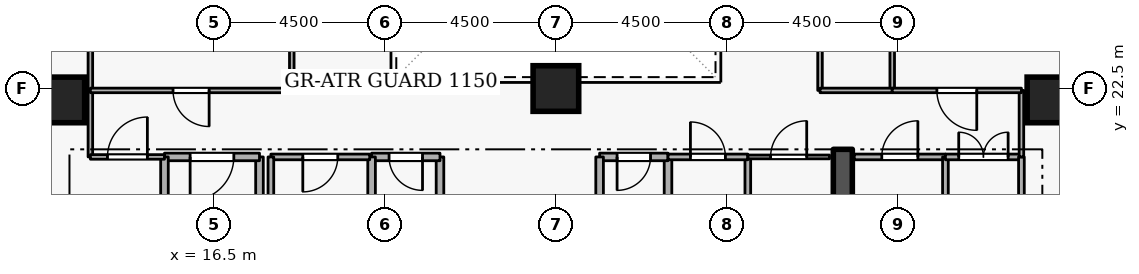
"""IFC4 building model, lengths in metres.
Left out: names, types, materials, properties, quantities, classifications, styles, units other than length and angle.
Written with IfcOpenShell. Run it as: python <this file> out.ifc"""

import sys

from ifc_helpers import new_model, si_unit, direction, frame, frame_2d, origin, origin_2d, place, context, subcontext, project, spatial, rectangle, extrude, element, fill, save


model = new_model("IFC4")
c1 = context("Model", 3, precision=1e-05, world=origin(), true_north=direction((0.0, 1.0)))
c2 = subcontext(c1, "Body", "Model", "MODEL_VIEW")
j1 = project(units=[si_unit("LENGTHUNIT", "METRE"), si_unit("PLANEANGLEUNIT", "RADIAN")], contexts=[c1])
p1 = place(None, origin())
s1 = spatial("IfcSite", under=j1, at=p1, CompositionType="ELEMENT")
p2 = place(p1, origin())
s2 = spatial("IfcBuilding", under=s1, at=p2, CompositionType="ELEMENT")
p3 = place(p2, frame((0.0, 0.0, 137.7)))
s3 = spatial("IfcBuildingStorey", under=s2, at=p3, CompositionType="ELEMENT", Elevation=137.7)
p4 = place(p3, frame((33.05, 15.1, 0.0), z_axis=(0.0, 0.0, 1.0), x_axis=(0.0, 1.0, 0.0)))
e1 = element("IfcWall", 1, at=p4, inside=s3, PredefinedType="SHEAR", context=c2, shape_type="SweptSolid", body=[
    extrude(rectangle(XDim=5.8, YDim=0.5, at=frame_2d((2.9, 0.0))), origin(), (0.0, 0.0, 1.0), 3.6),
])
for number, where, z_axis, x_axis in (
    (2, (12.5, 22.2, 0.0), (0.0, 0.0, 1.0), (1.0, 0.0, 0.0)),
    (3, (38.5, 22.2, 0.0), (0.0, 0.0, 1.0), (1.0, 0.0, 0.0)),
    (4, (25.5, 22.5, 0.0), (0.0, 0.0, 1.0), (1.0, 0.0, 0.0)),
):
    element("IfcColumn", number, at=place(p3, frame(where, z_axis=z_axis, x_axis=x_axis)), inside=s3, PredefinedType="COLUMN", context=c2, shape_type="SweptSolid", body=[
        extrude(rectangle(XDim=1.2, YDim=1.2, at=origin_2d()), origin(), (0.0, 0.0, 1.0), 3.6),
    ])
p5 = place(p3, frame((17.7, 18.4, 0.0), z_axis=(0.0, 0.0, 1.0), x_axis=(0.0, 1.0, 0.0)))
e5 = element("IfcWall", 5, at=p5, inside=s3, PredefinedType="STANDARD", context=c2, shape_type="SweptSolid", body=[
    extrude(rectangle(XDim=2.3, YDim=0.2, at=frame_2d((1.15, 0.0))), origin(), (0.0, 0.0, 1.0), 2.465),
])
p6 = place(p3, frame((17.7, 20.7, 0.0), z_axis=(0.0, 0.0, 1.0), x_axis=(-1.0, 0.0, 0.0)))
e6 = element("IfcWall", 6, at=p6, inside=s3, PredefinedType="STANDARD", context=c2, shape_type="SweptSolid", body=[
    extrude(rectangle(XDim=2.5, YDim=0.2, at=frame_2d((1.25, 0.0))), origin(), (0.0, 0.0, 1.0), 3.26),
])
p7 = place(p6, frame((0.675, 0.0, 0.0)))
e7 = element("IfcOpeningElement", 7, at=p7, cuts=e6, PredefinedType="OPENING", context=c2, shape_type="SweptSolid", body=[
    extrude(rectangle(XDim=1.15, YDim=2.1, at=frame_2d((0.575, 1.05))), frame((0.0, 0.11, 0.0), z_axis=(0.0, -1.0, 0.0), x_axis=(1.0, 0.0, 0.0)), (0.0, 0.0, 1.0), 0.22),
])
p8 = place(p3, frame((15.2, 20.7, 0.0), z_axis=(0.0, 0.0, 1.0), x_axis=(0.0, -1.0, 0.0)))
e8 = element("IfcWall", 8, at=p8, inside=s3, PredefinedType="STANDARD", context=c2, shape_type="SweptSolid", body=[
    extrude(rectangle(XDim=5.7, YDim=0.2, at=frame_2d((2.85, 0.0))), origin(), (0.0, 0.0, 1.0), 3.26),
])
p9 = place(p3, frame((28.45, 18.65, 0.0), z_axis=(0.0, 0.0, 1.0), x_axis=(0.0, 1.0, 0.0)))
e9 = element("IfcWall", 9, at=p9, inside=s3, PredefinedType="STANDARD", context=c2, shape_type="SweptSolid", body=[
    extrude(rectangle(XDim=2.05, YDim=0.2, at=frame_2d((1.025, 0.0))), origin(), (0.0, 0.0, 1.0), 3.26),
])
p10 = place(p3, frame((28.45, 20.7, 0.0), z_axis=(0.0, 0.0, 1.0), x_axis=(-1.0, 0.0, 0.0)))
e10 = element("IfcWall", 10, at=p10, inside=s3, PredefinedType="STANDARD", context=c2, shape_type="SweptSolid", body=[
    extrude(rectangle(XDim=1.8, YDim=0.2, at=frame_2d((0.9, 0.0))), origin(), (0.0, 0.0, 1.0), 3.26),
])
p11 = place(p10, frame((0.46, 0.0, 0.0)))
e11 = element("IfcOpeningElement", 11, at=p11, cuts=e10, PredefinedType="OPENING", context=c2, shape_type="SweptSolid", body=[
    extrude(rectangle(XDim=0.88, YDim=2.04, at=frame_2d((0.44, 1.02))), frame((0.0, 0.11, 0.0), z_axis=(0.0, -1.0, 0.0), x_axis=(1.0, 0.0, 0.0)), (0.0, 0.0, 1.0), 0.22),
])
for number, where, z_axis, x_axis in (
    (12, (26.65, 20.7, 0.0), (0.0, 0.0, 1.0), (0.0, -1.0, 0.0)),
    (13, (22.45, 18.65, 0.0), (0.0, 0.0, 1.0), (0.0, 1.0, 0.0)),
):
    element("IfcWall", number, at=place(p3, frame(where, z_axis=z_axis, x_axis=x_axis)), inside=s3, PredefinedType="STANDARD", context=c2, shape_type="SweptSolid", body=[
        extrude(rectangle(XDim=2.05, YDim=0.2, at=frame_2d((1.025, 0.0))), origin(), (0.0, 0.0, 1.0), 3.26),
    ])
p12 = place(p3, frame((22.45, 20.7, 0.0), z_axis=(0.0, 0.0, 1.0), x_axis=(-1.0, 0.0, 0.0)))
e14 = element("IfcWall", 14, at=p12, inside=s3, PredefinedType="STANDARD", context=c2, shape_type="SweptSolid", body=[
    extrude(rectangle(XDim=1.8, YDim=0.2, at=frame_2d((0.9, 0.0))), origin(), (0.0, 0.0, 1.0), 3.26),
])
p13 = place(p12, frame((0.46, 0.0, 0.0)))
e15 = element("IfcOpeningElement", 15, at=p13, cuts=e14, PredefinedType="OPENING", context=c2, shape_type="SweptSolid", body=[
    extrude(rectangle(XDim=0.88, YDim=2.04, at=frame_2d((0.44, 1.02))), frame((0.0, 0.11, 0.0), z_axis=(0.0, -1.0, 0.0), x_axis=(1.0, 0.0, 0.0)), (0.0, 0.0, 1.0), 0.22),
])
p14 = place(p3, frame((20.65, 20.7, 0.0), z_axis=(0.0, 0.0, 1.0), x_axis=(0.0, -1.0, 0.0)))
e16 = element("IfcWall", 16, at=p14, inside=s3, PredefinedType="STANDARD", context=c2, shape_type="SweptSolid", body=[
    extrude(rectangle(XDim=2.05, YDim=0.2, at=frame_2d((1.025, 0.0))), origin(), (0.0, 0.0, 1.0), 3.26),
])
p15 = place(p3, frame((20.6, 20.7, 0.0), z_axis=(0.0, 0.0, 1.0), x_axis=(-1.0, 0.0, 0.0)))
e17 = element("IfcWall", 17, at=p15, inside=s3, PredefinedType="PARTITIONING", context=c2, shape_type="SweptSolid", body=[
    extrude(rectangle(XDim=2.6, YDim=0.15, at=frame_2d((1.3, 0.0))), origin(), (0.0, 0.0, 1.0), 3.26),
])
p16 = place(p15, frame((0.84, 0.0, 0.0)))
e18 = element("IfcOpeningElement", 18, at=p16, cuts=e17, PredefinedType="OPENING", context=c2, shape_type="SweptSolid", body=[
    extrude(rectangle(XDim=0.92, YDim=2.08, at=frame_2d((0.46, 1.04))), frame((0.0, 0.085, 0.0), z_axis=(0.0, -1.0, 0.0), x_axis=(1.0, 0.0, 0.0)), (0.0, 0.0, 1.0), 0.17),
])
p17 = place(p3, frame((18.0, 20.7, 0.0), z_axis=(0.0, 0.0, 1.0), x_axis=(0.0, -1.0, 0.0)))
e19 = element("IfcWall", 19, at=p17, inside=s3, PredefinedType="PARTITIONING", context=c2, shape_type="SweptSolid", body=[
    extrude(rectangle(XDim=2.05, YDim=0.15, at=frame_2d((1.025, 0.0))), origin(), (0.0, 0.0, 1.0), 2.465),
])
p18 = place(p3, frame((30.55, 20.7, 0.0), z_axis=(0.0, 0.0, 1.0), x_axis=(0.0, -1.0, 0.0)))
e20 = element("IfcWall", 20, at=p18, inside=s3, PredefinedType="PARTITIONING", context=c2, shape_type="SweptSolid", body=[
    extrude(rectangle(XDim=2.05, YDim=0.15, at=frame_2d((1.025, 0.0))), origin(), (0.0, 0.0, 1.0), 3.26),
])
p19 = place(p3, frame((28.45, 20.7, 0.0), z_axis=(0.0, 0.0, 1.0), x_axis=(1.0, 0.0, 0.0)))
e21 = element("IfcWall", 21, at=p19, inside=s3, PredefinedType="PARTITIONING", context=c2, shape_type="SweptSolid", body=[
    extrude(rectangle(XDim=2.1, YDim=0.15, at=frame_2d((1.05, 0.0))), origin(), (0.0, 0.0, 1.0), 3.26),
])
p20 = place(p19, frame((0.59, 0.0, 0.0)))
e22 = element("IfcOpeningElement", 22, at=p20, cuts=e21, PredefinedType="OPENING", context=c2, shape_type="SweptSolid", body=[
    extrude(rectangle(XDim=0.92, YDim=2.08, at=frame_2d((0.46, 1.04))), frame((0.0, 0.085, 0.0), z_axis=(0.0, -1.0, 0.0), x_axis=(1.0, 0.0, 0.0)), (0.0, 0.0, 1.0), 0.17),
])
p21 = place(p3, frame((30.55, 20.7, 0.0), z_axis=(0.0, 0.0, 1.0), x_axis=(1.0, 0.0, 0.0)))
e23 = element("IfcWall", 23, at=p21, inside=s3, PredefinedType="PARTITIONING", context=c2, shape_type="SweptSolid", body=[
    extrude(rectangle(XDim=2.15, YDim=0.1, at=frame_2d((1.075, 0.0))), origin(), (0.0, 0.0, 1.0), 3.26),
])
p22 = place(p21, frame((0.6, 0.0, 0.0)))
e24 = element("IfcOpeningElement", 24, at=p22, cuts=e23, PredefinedType="OPENING", context=c2, shape_type="SweptSolid", body=[
    extrude(rectangle(XDim=0.95, YDim=2.1, at=frame_2d((0.475, 1.05))), frame((0.0, 0.06, 0.0), z_axis=(0.0, -1.0, 0.0), x_axis=(1.0, 0.0, 0.0)), (0.0, 0.0, 1.0), 0.12),
])
p23 = place(p3, frame((33.35, 20.7, 0.0), z_axis=(0.0, 0.0, 1.0), x_axis=(1.0, 0.0, 0.0)))
e25 = element("IfcWall", 25, at=p23, inside=s3, PredefinedType="PARTITIONING", context=c2, shape_type="SweptSolid", body=[
    extrude(rectangle(XDim=2.4, YDim=0.15, at=frame_2d((1.2, 0.0))), origin(), (0.0, 0.0, 1.0), 3.26),
])
p24 = place(p23, frame((0.725, 0.0, 0.0)))
e26 = element("IfcOpeningElement", 26, at=p24, cuts=e25, PredefinedType="OPENING", context=c2, shape_type="SweptSolid", body=[
    extrude(rectangle(XDim=0.95, YDim=2.1, at=frame_2d((0.475, 1.05))), frame((0.0, 0.085, 0.0), z_axis=(0.0, -1.0, 0.0), x_axis=(1.0, 0.0, 0.0)), (0.0, 0.0, 1.0), 0.17),
])
p25 = place(p3, frame((35.75, 20.7, 0.0), z_axis=(0.0, 0.0, 1.0), x_axis=(0.0, -1.0, 0.0)))
e27 = element("IfcWall", 27, at=p25, inside=s3, PredefinedType="PARTITIONING", context=c2, shape_type="SweptSolid", body=[
    extrude(rectangle(XDim=5.65, YDim=0.15, at=frame_2d((2.825, 0.0))), origin(), (0.0, 0.0, 1.0), 3.26),
])
p26 = place(p3, frame((35.75, 20.7, 0.0), z_axis=(0.0, 0.0, 1.0), x_axis=(1.0, 0.0, 0.0)))
e28 = element("IfcWall", 28, at=p26, inside=s3, PredefinedType="PARTITIONING", context=c2, shape_type="SweptSolid", body=[
    extrude(rectangle(XDim=2.0, YDim=0.15, at=frame_2d((1.0, 0.0))), origin(), (0.0, 0.0, 1.0), 3.26),
])
p27 = place(p26, frame((0.35, 0.0, 0.0)))
e29 = element("IfcOpeningElement", 29, at=p27, cuts=e28, PredefinedType="OPENING", context=c2, shape_type="SweptSolid", body=[
    extrude(rectangle(XDim=1.3, YDim=2.12, at=frame_2d((0.65, 1.06))), frame((0.0, 0.085, 0.0), z_axis=(0.0, -1.0, 0.0), x_axis=(1.0, 0.0, 0.0)), (0.0, 0.0, 1.0), 0.17),
])
p28 = place(p3, frame((37.75, 20.7, 0.0), z_axis=(0.0, 0.0, 1.0), x_axis=(0.0, -1.0, 0.0)))
e30 = element("IfcWall", 30, at=p28, inside=s3, PredefinedType="PARTITIONING", context=c2, shape_type="SweptSolid", body=[
    extrude(rectangle(XDim=5.65, YDim=0.15, at=frame_2d((2.825, 0.0))), origin(), (0.0, 0.0, 1.0), 3.26),
])
p29 = place(p3, frame((13.25, 22.45, 0.0), z_axis=(0.0, 0.0, 1.0), x_axis=(0.0, -1.0, 0.0)))
e31 = element("IfcWall", 31, at=p29, inside=s3, PredefinedType="PARTITIONING", context=c2, shape_type="SweptSolid", body=[
    extrude(rectangle(XDim=1.75, YDim=0.12, at=frame_2d((0.875, 0.0))), origin(), (0.0, 0.0, 1.0), 3.26),
])
p30 = place(p3, frame((13.25, 20.7, 0.0), z_axis=(0.0, 0.0, 1.0), x_axis=(1.0, 0.0, 0.0)))
e32 = element("IfcWall", 32, at=p30, inside=s3, PredefinedType="PARTITIONING", context=c2, shape_type="SweptSolid", body=[
    extrude(rectangle(XDim=1.95, YDim=0.12, at=frame_2d((0.975, 0.0))), origin(), (0.0, 0.0, 1.0), 3.26),
])
p31 = place(p30, frame((0.45, 0.0, 0.0)))
e33 = element("IfcOpeningElement", 33, at=p31, cuts=e32, PredefinedType="OPENING", context=c2, shape_type="SweptSolid", body=[
    extrude(rectangle(XDim=1.05, YDim=2.1, at=frame_2d((0.525, 1.05))), frame((0.0, 0.07, 0.0), z_axis=(0.0, -1.0, 0.0), x_axis=(1.0, 0.0, 0.0)), (0.0, 0.0, 1.0), 0.14),
])
for number, where, z_axis, x_axis in (
    (34, (13.25, 27.0, 0.0), (0.0, 0.0, 1.0), (0.0, -1.0, 0.0)),
    (35, (18.55, 27.0, 0.0), (0.0, 0.0, 1.0), (0.0, -1.0, 0.0)),
):
    element("IfcWall", number, at=place(p3, frame(where, z_axis=z_axis, x_axis=x_axis)), inside=s3, PredefinedType="PARTITIONING", context=c2, shape_type="SweptSolid", body=[
        extrude(rectangle(XDim=4.55, YDim=0.12, at=frame_2d((2.275, 0.0))), origin(), (0.0, 0.0, 1.0), 3.26),
    ])
p32 = place(p3, frame((18.55, 22.45, 0.0), z_axis=(0.0, 0.0, 1.0), x_axis=(-1.0, 0.0, 0.0)))
e36 = element("IfcWall", 36, at=p32, inside=s3, PredefinedType="PARTITIONING", context=c2, shape_type="SweptSolid", body=[
    extrude(rectangle(XDim=5.3, YDim=0.12, at=frame_2d((2.65, 0.0))), origin(), (0.0, 0.0, 1.0), 3.26),
])
p33 = place(p32, frame((2.175, 0.0, 0.0)))
e37 = element("IfcOpeningElement", 37, at=p33, cuts=e36, PredefinedType="OPENING", context=c2, shape_type="SweptSolid", body=[
    extrude(rectangle(XDim=0.95, YDim=2.1, at=frame_2d((0.475, 1.05))), frame((0.0, 0.07, 0.0), z_axis=(0.0, -1.0, 0.0), x_axis=(1.0, 0.0, 0.0)), (0.0, 0.0, 1.0), 0.14),
])
p34 = place(p3, frame((32.45, 22.45, 0.0), z_axis=(0.0, 0.0, 1.0), x_axis=(0.0, 1.0, 0.0)))
e38 = element("IfcWall", 38, at=p34, inside=s3, PredefinedType="PARTITIONING", context=c2, shape_type="SweptSolid", body=[
    extrude(rectangle(XDim=4.55, YDim=0.12, at=frame_2d((2.275, 0.0))), origin(), (0.0, 0.0, 1.0), 3.26),
])
p35 = place(p34, frame((1.8, 0.0, 0.0)))
e39 = element("IfcOpeningElement", 39, at=p35, cuts=e38, PredefinedType="OPENING", context=c2, shape_type="SweptSolid", body=[
    extrude(rectangle(XDim=0.95, YDim=2.1, at=frame_2d((0.475, 1.05))), frame((0.0, 0.07, 0.0), z_axis=(0.0, -1.0, 0.0), x_axis=(1.0, 0.0, 0.0)), (0.0, 0.0, 1.0), 0.14),
])
p36 = place(p3, frame((34.35, 27.0, 0.0), z_axis=(0.0, 0.0, 1.0), x_axis=(0.0, -1.0, 0.0)))
e40 = element("IfcWall", 40, at=p36, inside=s3, PredefinedType="PARTITIONING", context=c2, shape_type="SweptSolid", body=[
    extrude(rectangle(XDim=4.55, YDim=0.12, at=frame_2d((2.275, 0.0))), origin(), (0.0, 0.0, 1.0), 3.26),
])
p37 = place(p3, frame((34.35, 22.45, 0.0), z_axis=(0.0, 0.0, 1.0), x_axis=(-1.0, 0.0, 0.0)))
e41 = element("IfcWall", 41, at=p37, inside=s3, PredefinedType="PARTITIONING", context=c2, shape_type="SweptSolid", body=[
    extrude(rectangle(XDim=1.9, YDim=0.12, at=frame_2d((0.95, 0.0))), origin(), (0.0, 0.0, 1.0), 3.26),
])
p38 = place(p3, frame((37.75, 20.7, 0.0), z_axis=(0.0, 0.0, 1.0), x_axis=(0.0, 1.0, 0.0)))
e42 = element("IfcWall", 42, at=p38, inside=s3, PredefinedType="PARTITIONING", context=c2, shape_type="SweptSolid", body=[
    extrude(rectangle(XDim=1.75, YDim=0.12, at=frame_2d((0.875, 0.0))), origin(), (0.0, 0.0, 1.0), 3.26),
])
p39 = place(p3, frame((37.75, 22.45, 0.0), z_axis=(0.0, 0.0, 1.0), x_axis=(-1.0, 0.0, 0.0)))
e43 = element("IfcWall", 43, at=p39, inside=s3, PredefinedType="PARTITIONING", context=c2, shape_type="SweptSolid", body=[
    extrude(rectangle(XDim=3.4, YDim=0.12, at=frame_2d((1.7, 0.0))), origin(), (0.0, 0.0, 1.0), 3.26),
])
p40 = place(p39, frame((1.175, 0.0, 0.0)))
e44 = element("IfcOpeningElement", 44, at=p40, cuts=e43, PredefinedType="OPENING", context=c2, shape_type="SweptSolid", body=[
    extrude(rectangle(XDim=1.05, YDim=2.1, at=frame_2d((0.525, 1.05))), frame((0.0, 0.07, 0.0), z_axis=(0.0, -1.0, 0.0), x_axis=(1.0, 0.0, 0.0)), (0.0, 0.0, 1.0), 0.14),
])
p41 = place(p7, origin())
e45 = element("IfcDoor", 45, at=p41, inside=s3, OperationType="SINGLE_SWING_RIGHT", PredefinedType="DOOR", context=c2, shape_type="SweptSolid", body=[
    extrude(rectangle(XDim=1.15, YDim=2.1, at=frame_2d((0.575, 1.05))), frame((0.0, 0.025, 0.0), z_axis=(0.0, -1.0, 0.0), x_axis=(1.0, 0.0, 0.0)), (0.0, 0.0, 1.0), 0.05),
])
fill(e7, e45)
p42 = place(p11, origin())
e46 = element("IfcDoor", 46, at=p42, inside=s3, OperationType="SINGLE_SWING_RIGHT", PredefinedType="DOOR", context=c2, shape_type="SweptSolid", body=[
    extrude(rectangle(XDim=0.88, YDim=2.04, at=frame_2d((0.44, 1.02))), frame((0.0, 0.025, 0.0), z_axis=(0.0, -1.0, 0.0), x_axis=(1.0, 0.0, 0.0)), (0.0, 0.0, 1.0), 0.05),
])
fill(e11, e46)
p43 = place(p13, origin())
e47 = element("IfcDoor", 47, at=p43, inside=s3, OperationType="SINGLE_SWING_LEFT", PredefinedType="DOOR", context=c2, shape_type="SweptSolid", body=[
    extrude(rectangle(XDim=0.88, YDim=2.04, at=frame_2d((0.44, 1.02))), frame((0.0, 0.025, 0.0), z_axis=(0.0, -1.0, 0.0), x_axis=(1.0, 0.0, 0.0)), (0.0, 0.0, 1.0), 0.05),
])
fill(e15, e47)
p44 = place(p16, origin())
e48 = element("IfcDoor", 48, at=p44, inside=s3, OperationType="SINGLE_SWING_RIGHT", PredefinedType="DOOR", context=c2, shape_type="SweptSolid", body=[
    extrude(rectangle(XDim=0.92, YDim=2.08, at=frame_2d((0.46, 1.04))), frame((0.0, 0.025, 0.0), z_axis=(0.0, -1.0, 0.0), x_axis=(1.0, 0.0, 0.0)), (0.0, 0.0, 1.0), 0.05),
])
fill(e18, e48)
p45 = place(p20, origin())
e49 = element("IfcDoor", 49, at=p45, inside=s3, OperationType="SINGLE_SWING_LEFT", PredefinedType="DOOR", context=c2, shape_type="SweptSolid", body=[
    extrude(rectangle(XDim=0.92, YDim=2.08, at=frame_2d((0.46, 1.04))), frame((0.0, 0.025, 0.0), z_axis=(0.0, -1.0, 0.0), x_axis=(1.0, 0.0, 0.0)), (0.0, 0.0, 1.0), 0.05),
])
fill(e22, e49)
p46 = place(p22, origin())
e50 = element("IfcDoor", 50, at=p46, inside=s3, OperationType="SINGLE_SWING_RIGHT", PredefinedType="DOOR", context=c2, shape_type="SweptSolid", body=[
    extrude(rectangle(XDim=0.95, YDim=2.1, at=frame_2d((0.475, 1.05))), frame((0.0, 0.025, 0.0), z_axis=(0.0, -1.0, 0.0), x_axis=(1.0, 0.0, 0.0)), (0.0, 0.0, 1.0), 0.05),
])
fill(e24, e50)
p47 = place(p24, origin())
e51 = element("IfcDoor", 51, at=p47, inside=s3, OperationType="SINGLE_SWING_RIGHT", PredefinedType="DOOR", context=c2, shape_type="SweptSolid", body=[
    extrude(rectangle(XDim=0.95, YDim=2.1, at=frame_2d((0.475, 1.05))), frame((0.0, 0.025, 0.0), z_axis=(0.0, -1.0, 0.0), x_axis=(1.0, 0.0, 0.0)), (0.0, 0.0, 1.0), 0.05),
])
fill(e26, e51)
p48 = place(p27, origin())
e52 = element("IfcDoor", 52, at=p48, inside=s3, OperationType="DOUBLE_DOOR_SINGLE_SWING", PredefinedType="DOOR", context=c2, shape_type="SweptSolid", body=[
    extrude(rectangle(XDim=1.3, YDim=2.12, at=frame_2d((0.65, 1.06))), frame((0.0, 0.025, 0.0), z_axis=(0.0, -1.0, 0.0), x_axis=(1.0, 0.0, 0.0)), (0.0, 0.0, 1.0), 0.05),
])
fill(e29, e52)
p49 = place(p31, origin())
e53 = element("IfcDoor", 53, at=p49, inside=s3, OperationType="SINGLE_SWING_RIGHT", PredefinedType="DOOR", context=c2, shape_type="SweptSolid", body=[
    extrude(rectangle(XDim=1.05, YDim=2.1, at=frame_2d((0.525, 1.05))), frame((0.0, 0.025, 0.0), z_axis=(0.0, -1.0, 0.0), x_axis=(1.0, 0.0, 0.0)), (0.0, 0.0, 1.0), 0.05),
])
fill(e33, e53)
p50 = place(p33, origin())
e54 = element("IfcDoor", 54, at=p50, inside=s3, OperationType="SINGLE_SWING_LEFT", PredefinedType="DOOR", context=c2, shape_type="SweptSolid", body=[
    extrude(rectangle(XDim=0.95, YDim=2.1, at=frame_2d((0.475, 1.05))), frame((0.0, 0.025, 0.0), z_axis=(0.0, -1.0, 0.0), x_axis=(1.0, 0.0, 0.0)), (0.0, 0.0, 1.0), 0.05),
])
fill(e37, e54)
p51 = place(p40, origin())
e55 = element("IfcDoor", 55, at=p51, inside=s3, OperationType="SINGLE_SWING_LEFT", PredefinedType="DOOR", context=c2, shape_type="SweptSolid", body=[
    extrude(rectangle(XDim=1.05, YDim=2.1, at=frame_2d((0.525, 1.05))), frame((0.0, 0.025, 0.0), z_axis=(0.0, -1.0, 0.0), x_axis=(1.0, 0.0, 0.0)), (0.0, 0.0, 1.0), 0.05),
])
fill(e44, e55)
save(model, sys.argv[1])
